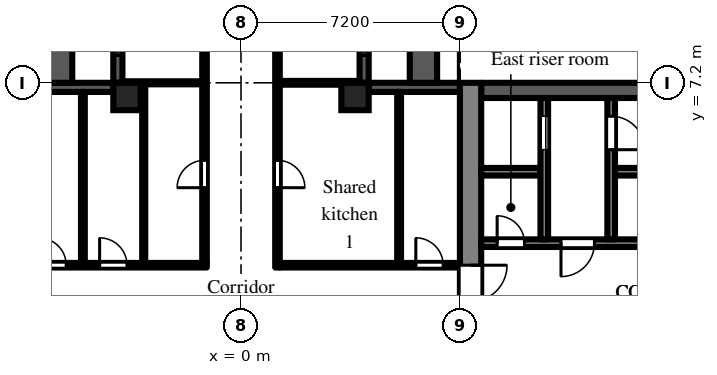
"""IFC4 building model, lengths in metres.
Left out: names, types, materials, properties, quantities, classifications, styles, units other than length and angle.
Written with IfcOpenShell. Run it as: python <this file> out.ifc"""

import sys

from ifc_helpers import new_model, si_unit, direction, frame, frame_2d, origin, origin_2d, place, context, subcontext, project, spatial, rectangle, extrude, element, fill, save


model = new_model("IFC4")
c1 = context("Model", 3, precision=1e-05, world=origin(), true_north=direction((0.0, 1.0)))
c2 = subcontext(c1, "Body", "Model", "MODEL_VIEW")
j1 = project(units=[si_unit("LENGTHUNIT", "METRE"), si_unit("PLANEANGLEUNIT", "RADIAN")], contexts=[c1])
p1 = place(None, origin())
s1 = spatial("IfcSite", under=j1, at=p1, CompositionType="ELEMENT")
p2 = place(p1, origin())
s2 = spatial("IfcBuilding", under=s1, at=p2, CompositionType="ELEMENT")
p3 = place(p2, frame((0.0, 0.0, 53.7)))
s3 = spatial("IfcBuildingStorey", under=s2, at=p3, CompositionType="ELEMENT", Elevation=53.7)
for number, where, z_axis, x_axis in (
    (1, (-3.75, 6.75, 0.0), (0.0, 0.0, 1.0), (1.0, 0.0, 0.0)),
    (2, (3.75, 6.75, 0.0), (0.0, 0.0, 1.0), (1.0, 0.0, 0.0)),
):
    element("IfcColumn", number, at=place(p3, frame(where, z_axis=z_axis, x_axis=x_axis)), inside=s3, PredefinedType="COLUMN", context=c2, shape_type="SweptSolid", body=[
        extrude(rectangle(XDim=0.9, YDim=0.9, at=origin_2d()), origin(), (0.0, 0.0, 1.0), 3.0),
    ])
p4 = place(p3, frame((7.2, 7.05, 0.0), z_axis=(0.0, 0.0, 1.0), x_axis=(-1.0, 0.0, 0.0)))
e3 = element("IfcWall", 3, at=p4, inside=s3, PredefinedType="SOLIDWALL", context=c2, shape_type="SweptSolid", body=[
    extrude(rectangle(XDim=3.0, YDim=0.3, at=frame_2d((1.5, 0.0))), origin(), (0.0, 0.0, 1.0), 2.1),
])
p5 = place(p3, frame((4.05, 7.2, 0.0), z_axis=(0.0, 0.0, 1.0), x_axis=(0.0, 1.0, 0.0)))
e4 = element("IfcWall", 4, at=p5, inside=s3, PredefinedType="SOLIDWALL", context=c2, shape_type="SweptSolid", body=[
    extrude(rectangle(XDim=7.2, YDim=0.3, at=frame_2d((3.6, 0.0))), origin(), (0.0, 0.0, 1.0), 2.1),
])
p6 = place(p5, frame((3.0, 0.0, 0.0)))
e5 = element("IfcOpeningElement", 5, at=p6, cuts=e4, PredefinedType="OPENING", context=c2, shape_type="SweptSolid", body=[
    extrude(rectangle(XDim=1.2, YDim=2.05, at=frame_2d((0.6, 1.025))), frame((0.0, 0.16, 0.0), z_axis=(0.0, -1.0, 0.0), x_axis=(1.0, 0.0, 0.0)), (0.0, 0.0, 1.0), 0.32),
])
p7 = place(p5, frame((0.9, 0.0, 0.2)))
e6 = element("IfcOpeningElement", 6, at=p7, cuts=e4, PredefinedType="OPENING", context=c2, shape_type="SweptSolid", body=[
    extrude(rectangle(XDim=1.8, YDim=1.85, at=frame_2d((0.9, 0.925))), frame((0.0, 0.16, 0.0), z_axis=(0.0, -1.0, 0.0), x_axis=(1.0, 0.0, 0.0)), (0.0, 0.0, 1.0), 0.32),
])
p8 = place(p5, frame((4.5, 0.0, 0.2)))
e7 = element("IfcOpeningElement", 7, at=p8, cuts=e4, PredefinedType="OPENING", context=c2, shape_type="SweptSolid", body=[
    extrude(rectangle(XDim=1.8, YDim=1.85, at=frame_2d((0.9, 0.925))), frame((0.0, 0.16, 0.0), z_axis=(0.0, -1.0, 0.0), x_axis=(1.0, 0.0, 0.0)), (0.0, 0.0, 1.0), 0.32),
])
p9 = place(p3, frame((-4.05, 14.4, 0.0), z_axis=(0.0, 0.0, 1.0), x_axis=(0.0, -1.0, 0.0)))
e8 = element("IfcWall", 8, at=p9, inside=s3, PredefinedType="SOLIDWALL", context=c2, shape_type="SweptSolid", body=[
    extrude(rectangle(XDim=7.2, YDim=0.3, at=frame_2d((3.6, 0.0))), origin(), (0.0, 0.0, 1.0), 2.1),
])
p10 = place(p9, frame((3.0, 0.0, 0.0)))
e9 = element("IfcOpeningElement", 9, at=p10, cuts=e8, PredefinedType="OPENING", context=c2, shape_type="SweptSolid", body=[
    extrude(rectangle(XDim=1.2, YDim=2.05, at=frame_2d((0.6, 1.025))), frame((0.0, 0.16, 0.0), z_axis=(0.0, -1.0, 0.0), x_axis=(1.0, 0.0, 0.0)), (0.0, 0.0, 1.0), 0.32),
])
p11 = place(p9, frame((0.9, 0.0, 0.2)))
e10 = element("IfcOpeningElement", 10, at=p11, cuts=e8, PredefinedType="OPENING", context=c2, shape_type="SweptSolid", body=[
    extrude(rectangle(XDim=1.8, YDim=1.85, at=frame_2d((0.9, 0.925))), frame((0.0, 0.16, 0.0), z_axis=(0.0, -1.0, 0.0), x_axis=(1.0, 0.0, 0.0)), (0.0, 0.0, 1.0), 0.32),
])
p12 = place(p9, frame((4.5, 0.0, 0.2)))
e11 = element("IfcOpeningElement", 11, at=p12, cuts=e8, PredefinedType="OPENING", context=c2, shape_type="SweptSolid", body=[
    extrude(rectangle(XDim=1.8, YDim=1.85, at=frame_2d((0.9, 0.925))), frame((0.0, 0.16, 0.0), z_axis=(0.0, -1.0, 0.0), x_axis=(1.0, 0.0, 0.0)), (0.0, 0.0, 1.0), 0.32),
])
p13 = place(p3, frame((-4.2, 7.05, 0.0), z_axis=(0.0, 0.0, 1.0), x_axis=(-1.0, 0.0, 0.0)))
e12 = element("IfcWall", 12, at=p13, inside=s3, PredefinedType="SOLIDWALL", context=c2, shape_type="SweptSolid", body=[
    extrude(rectangle(XDim=3.0, YDim=0.3, at=frame_2d((1.5, 0.0))), origin(), (0.0, 0.0, 1.0), 2.1),
])
for number, where, z_axis, x_axis in (
    (13, (6.0, 7.2, 0.0), (0.0, 0.0, 1.0), (0.0, 1.0, 0.0)),
    (14, (-6.0, 7.2, 0.0), (0.0, 0.0, 1.0), (0.0, 1.0, 0.0)),
):
    element("IfcWall", number, at=place(p3, frame(where, z_axis=z_axis, x_axis=x_axis)), inside=s3, PredefinedType="PARAPET", context=c2, shape_type="SweptSolid", body=[
        extrude(rectangle(XDim=7.2, YDim=0.9, at=frame_2d((3.6, 0.0))), origin(), (0.0, 0.0, 1.0), 0.8),
    ])
p14 = place(p3, frame((7.55, -7.2, 0.0), z_axis=(0.0, 0.0, 1.0), x_axis=(0.0, 1.0, 0.0)))
e15 = element("IfcWall", 15, at=p14, inside=s3, PredefinedType="SHEAR", context=c2, shape_type="SweptSolid", body=[
    extrude(rectangle(XDim=14.4, YDim=0.7, at=frame_2d((7.2, 0.0))), origin(), (0.0, 0.0, 1.0), 2.575),
])
p15 = place(p14, frame((6.0, 0.0, 0.0)))
e16 = element("IfcOpeningElement", 16, at=p15, cuts=e15, PredefinedType="OPENING", context=c2, shape_type="SweptSolid", body=[
    extrude(rectangle(XDim=2.4, YDim=2.2, at=frame_2d((1.2, 1.1))), frame((0.0, 0.36, 0.0), z_axis=(0.0, -1.0, 0.0), x_axis=(1.0, 0.0, 0.0)), (0.0, 0.0, 1.0), 0.72),
])
p16 = place(p3, frame((7.9, 6.95, 0.0), z_axis=(0.0, 0.0, 1.0), x_axis=(1.0, 0.0, 0.0)))
e17 = element("IfcWall", 17, at=p16, inside=s3, PredefinedType="SHEAR", context=c2, shape_type="SweptSolid", body=[
    extrude(rectangle(XDim=12.95, YDim=0.5, at=frame_2d((6.475, 0.0))), origin(), (0.0, 0.0, 1.0), 2.575),
])
p17 = place(p3, frame((7.9, 1.925, 0.0), z_axis=(0.0, 0.0, 1.0), x_axis=(1.0, 0.0, 0.0)))
e18 = element("IfcWall", 18, at=p17, inside=s3, PredefinedType="SHEAR", context=c2, shape_type="SweptSolid", body=[
    extrude(rectangle(XDim=12.95, YDim=0.25, at=frame_2d((6.475, 0.0))), origin(), (0.0, 0.0, 1.0), 2.575),
])
p18 = place(p17, frame((0.525, 0.0, 0.0)))
e19 = element("IfcOpeningElement", 19, at=p18, cuts=e18, PredefinedType="OPENING", context=c2, shape_type="SweptSolid", body=[
    extrude(rectangle(XDim=0.9, YDim=2.1, at=frame_2d((0.45, 1.05))), frame((0.0, 0.135, 0.0), z_axis=(0.0, -1.0, 0.0), x_axis=(1.0, 0.0, 0.0)), (0.0, 0.0, 1.0), 0.27),
])
p19 = place(p17, frame((2.625, 0.0, 0.0)))
e20 = element("IfcOpeningElement", 20, at=p19, cuts=e18, PredefinedType="OPENING", context=c2, shape_type="SweptSolid", body=[
    extrude(rectangle(XDim=1.1, YDim=2.1, at=frame_2d((0.55, 1.05))), frame((0.0, 0.135, 0.0), z_axis=(0.0, -1.0, 0.0), x_axis=(1.0, 0.0, 0.0)), (0.0, 0.0, 1.0), 0.27),
])
p20 = place(p17, frame((6.025, 0.0, 0.0)))
e21 = element("IfcOpeningElement", 21, at=p20, cuts=e18, PredefinedType="OPENING", context=c2, shape_type="SweptSolid", body=[
    extrude(rectangle(XDim=0.9, YDim=2.1, at=frame_2d((0.45, 1.05))), frame((0.0, 0.135, 0.0), z_axis=(0.0, -1.0, 0.0), x_axis=(1.0, 0.0, 0.0)), (0.0, 0.0, 1.0), 0.27),
])
p21 = place(p17, frame((9.325, 0.0, 0.0)))
e22 = element("IfcOpeningElement", 22, at=p21, cuts=e18, PredefinedType="OPENING", context=c2, shape_type="SweptSolid", body=[
    extrude(rectangle(XDim=0.9, YDim=2.1, at=frame_2d((0.45, 1.05))), frame((0.0, 0.135, 0.0), z_axis=(0.0, -1.0, 0.0), x_axis=(1.0, 0.0, 0.0)), (0.0, 0.0, 1.0), 0.27),
])
p22 = place(p3, frame((7.9, 4.275, 0.0), z_axis=(0.0, 0.0, 1.0), x_axis=(1.0, 0.0, 0.0)))
e23 = element("IfcWall", 23, at=p22, inside=s3, PredefinedType="SHEAR", context=c2, shape_type="SweptSolid", body=[
    extrude(rectangle(XDim=1.95, YDim=0.25, at=frame_2d((0.975, 0.0))), origin(), (0.0, 0.0, 1.0), 2.575),
])
p23 = place(p3, frame((12.3, 4.275, 0.0), z_axis=(0.0, 0.0, 1.0), x_axis=(1.0, 0.0, 0.0)))
e24 = element("IfcWall", 24, at=p23, inside=s3, PredefinedType="SHEAR", context=c2, shape_type="SweptSolid", body=[
    extrude(rectangle(XDim=8.55, YDim=0.25, at=frame_2d((4.275, 0.0))), origin(), (0.0, 0.0, 1.0), 2.575),
])
p24 = place(p3, frame((9.975, 2.05, 0.0), z_axis=(0.0, 0.0, 1.0), x_axis=(0.0, 1.0, 0.0)))
e25 = element("IfcWall", 25, at=p24, inside=s3, PredefinedType="SHEAR", context=c2, shape_type="SweptSolid", body=[
    extrude(rectangle(XDim=4.65, YDim=0.25, at=frame_2d((2.325, 0.0))), origin(), (0.0, 0.0, 1.0), 2.575),
])
p25 = place(p24, frame((2.95, 0.0, 0.0)))
e26 = element("IfcOpeningElement", 26, at=p25, cuts=e25, PredefinedType="OPENING", context=c2, shape_type="SweptSolid", body=[
    extrude(rectangle(XDim=1.1, YDim=2.1, at=frame_2d((0.55, 1.05))), frame((0.0, 0.135, 0.0), z_axis=(0.0, -1.0, 0.0), x_axis=(1.0, 0.0, 0.0)), (0.0, 0.0, 1.0), 0.27),
])
p26 = place(p3, frame((12.175, 2.05, 0.0), z_axis=(0.0, 0.0, 1.0), x_axis=(0.0, 1.0, 0.0)))
e27 = element("IfcWall", 27, at=p26, inside=s3, PredefinedType="SHEAR", context=c2, shape_type="SweptSolid", body=[
    extrude(rectangle(XDim=4.65, YDim=0.25, at=frame_2d((2.325, 0.0))), origin(), (0.0, 0.0, 1.0), 2.575),
])
p27 = place(p26, frame((2.95, 0.0, 0.0)))
e28 = element("IfcOpeningElement", 28, at=p27, cuts=e27, PredefinedType="OPENING", context=c2, shape_type="SweptSolid", body=[
    extrude(rectangle(XDim=1.1, YDim=2.1, at=frame_2d((0.55, 1.05))), frame((0.0, 0.135, 0.0), z_axis=(0.0, -1.0, 0.0), x_axis=(1.0, 0.0, 0.0)), (0.0, 0.0, 1.0), 0.27),
])
p28 = place(p3, frame((-7.2, 1.2, 0.0), z_axis=(0.0, 0.0, 1.0), x_axis=(1.0, 0.0, 0.0)))
e29 = element("IfcWall", 29, at=p28, inside=s3, PredefinedType="PARTITIONING", context=c2, shape_type="SweptSolid", body=[
    extrude(rectangle(XDim=6.075, YDim=0.15, at=frame_2d((3.038, 0.0))), origin(), (0.0, 0.0, 1.0), 2.575),
])
p29 = place(p28, frame((2.55, 0.0, 0.0)))
e30 = element("IfcOpeningElement", 30, at=p29, cuts=e29, PredefinedType="OPENING", context=c2, shape_type="SweptSolid", body=[
    extrude(rectangle(XDim=0.9, YDim=2.1, at=frame_2d((0.45, 1.05))), frame((0.0, 0.085, 0.0), z_axis=(0.0, -1.0, 0.0), x_axis=(1.0, 0.0, 0.0)), (0.0, 0.0, 1.0), 0.17),
])
p30 = place(p28, frame((0.55, 0.0, 0.0)))
e31 = element("IfcOpeningElement", 31, at=p30, cuts=e29, PredefinedType="OPENING", context=c2, shape_type="SweptSolid", body=[
    extrude(rectangle(XDim=0.9, YDim=2.1, at=frame_2d((0.45, 1.05))), frame((0.0, 0.085, 0.0), z_axis=(0.0, -1.0, 0.0), x_axis=(1.0, 0.0, 0.0)), (0.0, 0.0, 1.0), 0.17),
])
p31 = place(p3, frame((-5.2, 1.275, 0.0), z_axis=(0.0, 0.0, 1.0), x_axis=(0.0, 1.0, 0.0)))
e32 = element("IfcWall", 32, at=p31, inside=s3, PredefinedType="PARTITIONING", context=c2, shape_type="SweptSolid", body=[
    extrude(rectangle(XDim=5.625, YDim=0.125, at=frame_2d((2.812, 0.0))), origin(), (0.0, 0.0, 1.0), 2.575),
])
p32 = place(p3, frame((-3.9, 7.2, 0.0), z_axis=(0.0, 0.0, 1.0), x_axis=(1.0, 0.0, 0.0)))
e33 = element("IfcWall", 33, at=p32, inside=s3, PredefinedType="PARTITIONING", context=c2, shape_type="SweptSolid", body=[
    extrude(rectangle(XDim=2.625, YDim=0.1, at=frame_2d((1.312, 0.0))), origin(), (0.0, 0.0, 1.0), 2.575),
])
p33 = place(p3, frame((-3.2, 1.275, 0.0), z_axis=(0.0, 0.0, 1.0), x_axis=(0.0, 1.0, 0.0)))
e34 = element("IfcWall", 34, at=p33, inside=s3, PredefinedType="PARTITIONING", context=c2, shape_type="SweptSolid", body=[
    extrude(rectangle(XDim=5.875, YDim=0.1, at=frame_2d((2.938, 0.0))), origin(), (0.0, 0.0, 1.0), 2.575),
])
p34 = place(p3, frame((-1.2, 1.275, 0.0), z_axis=(0.0, 0.0, 1.0), x_axis=(0.0, 1.0, 0.0)))
e35 = element("IfcWall", 35, at=p34, inside=s3, PredefinedType="PARTITIONING", context=c2, shape_type="SweptSolid", body=[
    extrude(rectangle(XDim=35.225, YDim=0.15, at=frame_2d((17.613, 0.0))), origin(), (0.0, 0.0, 1.0), 2.575),
])
p35 = place(p34, frame((2.475, 0.0, 0.0)))
e36 = element("IfcOpeningElement", 36, at=p35, cuts=e35, PredefinedType="OPENING", context=c2, shape_type="SweptSolid", body=[
    extrude(rectangle(XDim=0.9, YDim=2.1, at=frame_2d((0.45, 1.05))), frame((0.0, 0.085, 0.0), z_axis=(0.0, -1.0, 0.0), x_axis=(1.0, 0.0, 0.0)), (0.0, 0.0, 1.0), 0.17),
])
p36 = place(p34, frame((11.275, 0.0, 0.0)))
e37 = element("IfcOpeningElement", 37, at=p36, cuts=e35, PredefinedType="OPENING", context=c2, shape_type="SweptSolid", body=[
    extrude(rectangle(XDim=0.9, YDim=2.1, at=frame_2d((0.45, 1.05))), frame((0.0, 0.085, 0.0), z_axis=(0.0, -1.0, 0.0), x_axis=(1.0, 0.0, 0.0)), (0.0, 0.0, 1.0), 0.17),
])
p37 = place(p34, frame((7.675, 0.0, 0.0)))
e38 = element("IfcOpeningElement", 38, at=p37, cuts=e35, PredefinedType="OPENING", context=c2, shape_type="SweptSolid", body=[
    extrude(rectangle(XDim=0.9, YDim=2.1, at=frame_2d((0.45, 1.05))), frame((0.0, 0.085, 0.0), z_axis=(0.0, -1.0, 0.0), x_axis=(1.0, 0.0, 0.0)), (0.0, 0.0, 1.0), 0.17),
])
p38 = place(p34, frame((19.125, 0.0, 0.0)))
e39 = element("IfcOpeningElement", 39, at=p38, cuts=e35, PredefinedType="OPENING", context=c2, shape_type="SweptSolid", body=[
    extrude(rectangle(XDim=1.0, YDim=2.1, at=frame_2d((0.5, 1.05))), frame((0.0, 0.085, 0.0), z_axis=(0.0, -1.0, 0.0), x_axis=(1.0, 0.0, 0.0)), (0.0, 0.0, 1.0), 0.17),
])
p39 = place(p34, frame((21.675, 0.0, 0.0)))
e40 = element("IfcOpeningElement", 40, at=p39, cuts=e35, PredefinedType="OPENING", context=c2, shape_type="SweptSolid", body=[
    extrude(rectangle(XDim=0.9, YDim=2.1, at=frame_2d((0.45, 1.05))), frame((0.0, 0.085, 0.0), z_axis=(0.0, -1.0, 0.0), x_axis=(1.0, 0.0, 0.0)), (0.0, 0.0, 1.0), 0.17),
])
p40 = place(p34, frame((29.925, 0.0, 0.0)))
e41 = element("IfcOpeningElement", 41, at=p40, cuts=e35, PredefinedType="OPENING", context=c2, shape_type="SweptSolid", body=[
    extrude(rectangle(XDim=1.0, YDim=2.1, at=frame_2d((0.5, 1.05))), frame((0.0, 0.085, 0.0), z_axis=(0.0, -1.0, 0.0), x_axis=(1.0, 0.0, 0.0)), (0.0, 0.0, 1.0), 0.17),
])
p41 = place(p34, frame((32.275, 0.0, 0.0)))
e42 = element("IfcOpeningElement", 42, at=p41, cuts=e35, PredefinedType="OPENING", context=c2, shape_type="SweptSolid", body=[
    extrude(rectangle(XDim=1.8, YDim=2.1, at=frame_2d((0.9, 1.05))), frame((0.0, 0.085, 0.0), z_axis=(0.0, -1.0, 0.0), x_axis=(1.0, 0.0, 0.0)), (0.0, 0.0, 1.0), 0.17),
])
p42 = place(p3, frame((1.2, 1.125, 0.0), z_axis=(0.0, 0.0, 1.0), x_axis=(0.0, 1.0, 0.0)))
e43 = element("IfcWall", 43, at=p42, inside=s3, PredefinedType="PARTITIONING", context=c2, shape_type="SweptSolid", body=[
    extrude(rectangle(XDim=35.375, YDim=0.15, at=frame_2d((17.688, 0.0))), origin(), (0.0, 0.0, 1.0), 2.575),
])
p43 = place(p42, frame((2.625, 0.0, 0.0)))
e44 = element("IfcOpeningElement", 44, at=p43, cuts=e43, PredefinedType="OPENING", context=c2, shape_type="SweptSolid", body=[
    extrude(rectangle(XDim=0.9, YDim=2.1, at=frame_2d((0.45, 1.05))), frame((0.0, 0.085, 0.0), z_axis=(0.0, -1.0, 0.0), x_axis=(1.0, 0.0, 0.0)), (0.0, 0.0, 1.0), 0.17),
])
p44 = place(p42, frame((7.425, 0.0, 0.0)))
e45 = element("IfcOpeningElement", 45, at=p44, cuts=e43, PredefinedType="OPENING", context=c2, shape_type="SweptSolid", body=[
    extrude(rectangle(XDim=0.9, YDim=2.1, at=frame_2d((0.45, 1.05))), frame((0.0, 0.085, 0.0), z_axis=(0.0, -1.0, 0.0), x_axis=(1.0, 0.0, 0.0)), (0.0, 0.0, 1.0), 0.17),
])
p45 = place(p42, frame((13.725, 0.0, 0.0)))
e46 = element("IfcOpeningElement", 46, at=p45, cuts=e43, PredefinedType="OPENING", context=c2, shape_type="SweptSolid", body=[
    extrude(rectangle(XDim=0.9, YDim=2.1, at=frame_2d((0.45, 1.05))), frame((0.0, 0.085, 0.0), z_axis=(0.0, -1.0, 0.0), x_axis=(1.0, 0.0, 0.0)), (0.0, 0.0, 1.0), 0.17),
])
p46 = place(p42, frame((15.525, 0.0, 0.0)))
e47 = element("IfcOpeningElement", 47, at=p46, cuts=e43, PredefinedType="OPENING", context=c2, shape_type="SweptSolid", body=[
    extrude(rectangle(XDim=0.9, YDim=2.1, at=frame_2d((0.45, 1.05))), frame((0.0, 0.085, 0.0), z_axis=(0.0, -1.0, 0.0), x_axis=(1.0, 0.0, 0.0)), (0.0, 0.0, 1.0), 0.17),
])
p47 = place(p42, frame((32.825, 0.0, 0.0)))
e48 = element("IfcOpeningElement", 48, at=p47, cuts=e43, PredefinedType="OPENING", context=c2, shape_type="SweptSolid", body=[
    extrude(rectangle(XDim=1.0, YDim=2.1, at=frame_2d((0.5, 1.05))), frame((0.0, 0.085, 0.0), z_axis=(0.0, -1.0, 0.0), x_axis=(1.0, 0.0, 0.0)), (0.0, 0.0, 1.0), 0.17),
])
p48 = place(p3, frame((1.275, 1.2, 0.0), z_axis=(0.0, 0.0, 1.0), x_axis=(1.0, 0.0, 0.0)))
e49 = element("IfcWall", 49, at=p48, inside=s3, PredefinedType="PARTITIONING", context=c2, shape_type="SweptSolid", body=[
    extrude(rectangle(XDim=5.925, YDim=0.15, at=frame_2d((2.962, 0.0))), origin(), (0.0, 0.0, 1.0), 2.575),
])
p49 = place(p48, frame((4.475, 0.0, 0.0)))
e50 = element("IfcOpeningElement", 50, at=p49, cuts=e49, PredefinedType="OPENING", context=c2, shape_type="SweptSolid", body=[
    extrude(rectangle(XDim=0.9, YDim=2.1, at=frame_2d((0.45, 1.05))), frame((0.0, 0.085, 0.0), z_axis=(0.0, -1.0, 0.0), x_axis=(1.0, 0.0, 0.0)), (0.0, 0.0, 1.0), 0.17),
])
p50 = place(p3, frame((1.275, 7.2, 0.0), z_axis=(0.0, 0.0, 1.0), x_axis=(1.0, 0.0, 0.0)))
e51 = element("IfcWall", 51, at=p50, inside=s3, PredefinedType="PARTITIONING", context=c2, shape_type="SweptSolid", body=[
    extrude(rectangle(XDim=2.625, YDim=0.125, at=frame_2d((1.312, 0.0))), origin(), (0.0, 0.0, 1.0), 2.575),
])
p51 = place(p3, frame((5.2, 1.275, 0.0), z_axis=(0.0, 0.0, 1.0), x_axis=(0.0, 1.0, 0.0)))
e52 = element("IfcWall", 52, at=p51, inside=s3, PredefinedType="PARTITIONING", context=c2, shape_type="SweptSolid", body=[
    extrude(rectangle(XDim=5.625, YDim=0.125, at=frame_2d((2.812, 0.0))), origin(), (0.0, 0.0, 1.0), 2.575),
])
p52 = place(p7, origin())
e53 = element("IfcWindow", 53, at=p52, inside=s3, PartitioningType="SINGLE_PANEL", PredefinedType="WINDOW", context=c2, shape_type="SweptSolid", body=[
    extrude(rectangle(XDim=1.8, YDim=1.85, at=frame_2d((0.9, 0.925))), frame((0.0, 0.03, 0.0), z_axis=(0.0, -1.0, 0.0), x_axis=(1.0, 0.0, 0.0)), (0.0, 0.0, 1.0), 0.06),
])
fill(e6, e53)
p53 = place(p12, origin())
e54 = element("IfcWindow", 54, at=p53, inside=s3, PartitioningType="SINGLE_PANEL", PredefinedType="WINDOW", context=c2, shape_type="SweptSolid", body=[
    extrude(rectangle(XDim=1.8, YDim=1.85, at=frame_2d((0.9, 0.925))), frame((0.0, 0.03, 0.0), z_axis=(0.0, -1.0, 0.0), x_axis=(1.0, 0.0, 0.0)), (0.0, 0.0, 1.0), 0.06),
])
fill(e11, e54)
p54 = place(p25, origin())
e55 = element("IfcDoor", 55, at=p54, inside=s3, OperationType="SLIDING_TO_LEFT", PredefinedType="DOOR", context=c2, shape_type="SweptSolid", body=[
    extrude(rectangle(XDim=1.1, YDim=2.1, at=frame_2d((0.55, 1.05))), frame((0.0, 0.025, 0.0), z_axis=(0.0, -1.0, 0.0), x_axis=(1.0, 0.0, 0.0)), (0.0, 0.0, 1.0), 0.05),
])
fill(e26, e55)
p55 = place(p27, frame((1.1, 0.0, 0.0), z_axis=(0.0, 0.0, 1.0), x_axis=(-1.0, 0.0, 0.0)))
e56 = element("IfcDoor", 56, at=p55, inside=s3, OperationType="SINGLE_SWING_RIGHT", PredefinedType="DOOR", context=c2, shape_type="SweptSolid", body=[
    extrude(rectangle(XDim=1.1, YDim=2.1, at=frame_2d((0.55, 1.05))), frame((0.0, 0.025, 0.0), z_axis=(0.0, -1.0, 0.0), x_axis=(1.0, 0.0, 0.0)), (0.0, 0.0, 1.0), 0.05),
])
fill(e28, e56)
p56 = place(p18, origin())
e57 = element("IfcDoor", 57, at=p56, inside=s3, OperationType="SINGLE_SWING_LEFT", PredefinedType="DOOR", context=c2, shape_type="SweptSolid", body=[
    extrude(rectangle(XDim=0.9, YDim=2.1, at=frame_2d((0.45, 1.05))), frame((0.0, 0.025, 0.0), z_axis=(0.0, -1.0, 0.0), x_axis=(1.0, 0.0, 0.0)), (0.0, 0.0, 1.0), 0.05),
])
fill(e19, e57)
p57 = place(p19, frame((1.1, 0.0, 0.0), z_axis=(0.0, 0.0, 1.0), x_axis=(-1.0, 0.0, 0.0)))
e58 = element("IfcDoor", 58, at=p57, inside=s3, OperationType="SINGLE_SWING_RIGHT", PredefinedType="DOOR", context=c2, shape_type="SweptSolid", body=[
    extrude(rectangle(XDim=1.1, YDim=2.1, at=frame_2d((0.55, 1.05))), frame((0.0, 0.025, 0.0), z_axis=(0.0, -1.0, 0.0), x_axis=(1.0, 0.0, 0.0)), (0.0, 0.0, 1.0), 0.05),
])
fill(e20, e58)
p58 = place(p15, frame((2.4, 0.0, 0.0), z_axis=(0.0, 0.0, 1.0), x_axis=(-1.0, 0.0, 0.0)))
e59 = element("IfcDoor", 59, at=p58, inside=s3, OperationType="DOUBLE_DOOR_DOUBLE_SWING", PredefinedType="DOOR", context=c2, shape_type="SweptSolid", body=[
    extrude(rectangle(XDim=2.4, YDim=2.2, at=frame_2d((1.2, 1.1))), frame((0.0, 0.025, 0.0), z_axis=(0.0, -1.0, 0.0), x_axis=(1.0, 0.0, 0.0)), (0.0, 0.0, 1.0), 0.05),
])
fill(e16, e59)
p59 = place(p43, frame((0.9, 0.0, 0.0), z_axis=(0.0, 0.0, 1.0), x_axis=(-1.0, 0.0, 0.0)))
e60 = element("IfcDoor", 60, at=p59, inside=s3, OperationType="SINGLE_SWING_RIGHT", PredefinedType="DOOR", context=c2, shape_type="SweptSolid", body=[
    extrude(rectangle(XDim=0.9, YDim=2.1, at=frame_2d((0.45, 1.05))), frame((0.0, 0.025, 0.0), z_axis=(0.0, -1.0, 0.0), x_axis=(1.0, 0.0, 0.0)), (0.0, 0.0, 1.0), 0.05),
])
fill(e44, e60)
p60 = place(p49, origin())
e61 = element("IfcDoor", 61, at=p60, inside=s3, OperationType="SINGLE_SWING_LEFT", PredefinedType="DOOR", context=c2, shape_type="SweptSolid", body=[
    extrude(rectangle(XDim=0.9, YDim=2.1, at=frame_2d((0.45, 1.05))), frame((0.0, 0.025, 0.0), z_axis=(0.0, -1.0, 0.0), x_axis=(1.0, 0.0, 0.0)), (0.0, 0.0, 1.0), 0.05),
])
fill(e50, e61)
p61 = place(p35, origin())
e62 = element("IfcDoor", 62, at=p61, inside=s3, OperationType="SINGLE_SWING_LEFT", PredefinedType="DOOR", context=c2, shape_type="SweptSolid", body=[
    extrude(rectangle(XDim=0.9, YDim=2.1, at=frame_2d((0.45, 1.05))), frame((0.0, 0.025, 0.0), z_axis=(0.0, -1.0, 0.0), x_axis=(1.0, 0.0, 0.0)), (0.0, 0.0, 1.0), 0.05),
])
fill(e36, e62)
p62 = place(p29, origin())
e63 = element("IfcDoor", 63, at=p62, inside=s3, OperationType="SINGLE_SWING_LEFT", PredefinedType="DOOR", context=c2, shape_type="SweptSolid", body=[
    extrude(rectangle(XDim=0.9, YDim=2.1, at=frame_2d((0.45, 1.05))), frame((0.0, 0.025, 0.0), z_axis=(0.0, -1.0, 0.0), x_axis=(1.0, 0.0, 0.0)), (0.0, 0.0, 1.0), 0.05),
])
fill(e30, e63)
p63 = place(p30, origin())
e64 = element("IfcDoor", 64, at=p63, inside=s3, OperationType="SINGLE_SWING_LEFT", PredefinedType="DOOR", context=c2, shape_type="SweptSolid", body=[
    extrude(rectangle(XDim=0.9, YDim=2.1, at=frame_2d((0.45, 1.05))), frame((0.0, 0.025, 0.0), z_axis=(0.0, -1.0, 0.0), x_axis=(1.0, 0.0, 0.0)), (0.0, 0.0, 1.0), 0.05),
])
fill(e31, e64)
save(model, sys.argv[1])
